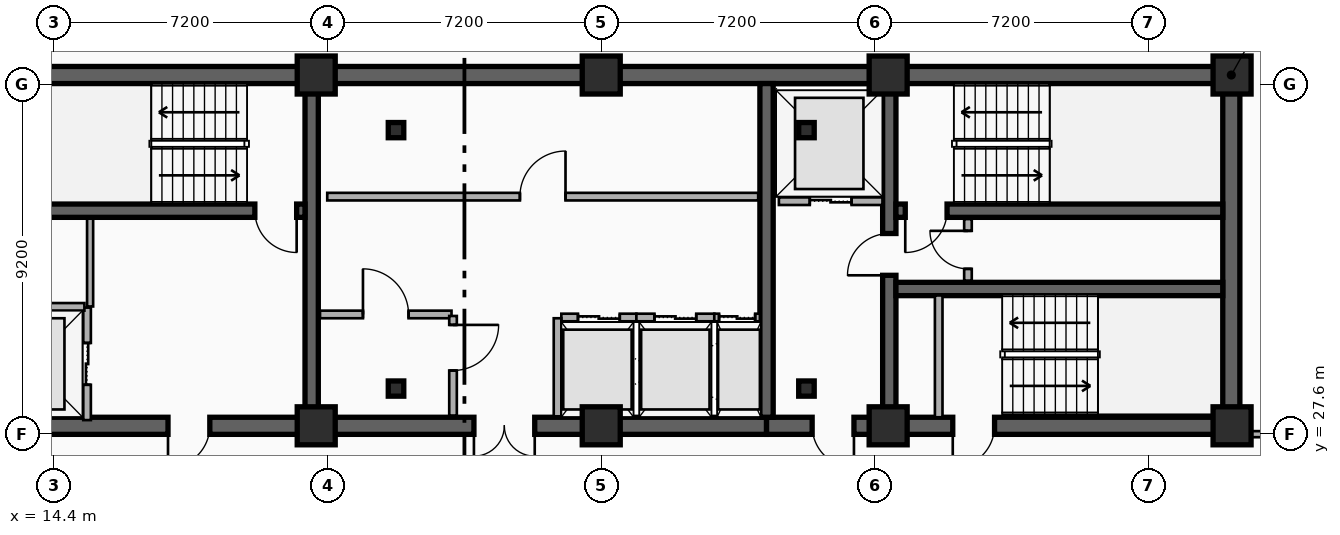
"""IFC4 building model, lengths in metres.
Left out: names, types, materials, properties, quantities, classifications, styles, units other than length and angle.
Written with IfcOpenShell. Run it as: python <this file> out.ifc"""

import sys

from ifc_helpers import new_model, si_unit, direction, frame, frame_2d, origin, origin_2d, place, context, subcontext, project, spatial, rectangle, i_section, extrude, element, fill, save


model = new_model("IFC4")
c1 = context("Model", 3, precision=1e-05, world=origin(), true_north=direction((0.0, 1.0)))
c2 = subcontext(c1, "Body", "Model", "MODEL_VIEW")
j1 = project(units=[si_unit("LENGTHUNIT", "METRE"), si_unit("PLANEANGLEUNIT", "RADIAN")], contexts=[c1])
p1 = place(None, origin())
s1 = spatial("IfcSite", under=j1, at=p1, CompositionType="ELEMENT")
p2 = place(p1, origin())
s2 = spatial("IfcBuilding", under=s1, at=p2, CompositionType="ELEMENT")
p3 = place(p2, frame((0.0, 0.0, 225.6)))
s3 = spatial("IfcBuildingStorey", under=s2, at=p3, CompositionType="ELEMENT", Elevation=225.6)
p4 = place(p3, frame((12.15, 37.05, 0.0), z_axis=(0.0, 0.0, 1.0), x_axis=(1.0, 0.0, 0.0)))
e1 = element("IfcWall", 1, at=p4, inside=s3, PredefinedType="SHEAR", context=c2, shape_type="SweptSolid", body=[
    extrude(rectangle(XDim=33.23, YDim=0.45, at=frame_2d((16.615, 0.0))), origin(), (0.0, 0.0, 1.0), 3.6),
])
p5 = place(p3, frame((21.18, 27.82, 0.0), z_axis=(0.0, 0.0, 1.0), x_axis=(-1.0, 0.0, 0.0)))
e2 = element("IfcWall", 2, at=p5, inside=s3, PredefinedType="SHEAR", context=c2, shape_type="SweptSolid", body=[
    extrude(rectangle(XDim=9.03, YDim=0.45, at=frame_2d((4.515, 0.0))), origin(), (0.0, 0.0, 1.0), 3.6),
])
p6 = place(p5, frame((2.68, 0.0, 0.0)))
e3 = element("IfcOpeningElement", 3, at=p6, cuts=e2, PredefinedType="OPENING", context=c2, shape_type="SweptSolid", body=[
    extrude(rectangle(XDim=1.1, YDim=2.15, at=frame_2d((0.55, 1.075))), frame((0.0, 0.235, 0.0), z_axis=(0.0, -1.0, 0.0), x_axis=(1.0, 0.0, 0.0)), (0.0, 0.0, 1.0), 0.47),
])
p7 = place(p3, frame((33.15, 27.82, 0.0), z_axis=(0.0, 0.0, 1.0), x_axis=(-1.0, 0.0, 0.0)))
e4 = element("IfcWall", 4, at=p7, inside=s3, PredefinedType="SHEAR", context=c2, shape_type="SweptSolid", body=[
    extrude(rectangle(XDim=11.97, YDim=0.45, at=frame_2d((5.985, 0.0))), origin(), (0.0, 0.0, 1.0), 3.6),
])
p8 = place(p7, frame((6.1, 0.0, 0.0)))
e5 = element("IfcOpeningElement", 5, at=p8, cuts=e4, PredefinedType="OPENING", context=c2, shape_type="SweptSolid", body=[
    extrude(rectangle(XDim=1.6, YDim=2.2, at=frame_2d((0.8, 1.1))), frame((0.0, 0.235, 0.0), z_axis=(0.0, -1.0, 0.0), x_axis=(1.0, 0.0, 0.0)), (0.0, 0.0, 1.0), 0.47),
])
p9 = place(p3, frame((45.38, 27.82, 0.0), z_axis=(0.0, 0.0, 1.0), x_axis=(-1.0, 0.0, 0.0)))
e6 = element("IfcWall", 6, at=p9, inside=s3, PredefinedType="SHEAR", context=c2, shape_type="SweptSolid", body=[
    extrude(rectangle(XDim=12.23, YDim=0.45, at=frame_2d((6.115, 0.0))), origin(), (0.0, 0.0, 1.0), 3.6),
])
p10 = place(p9, frame((9.93, 0.0, 0.0)))
e7 = element("IfcOpeningElement", 7, at=p10, cuts=e6, PredefinedType="OPENING", context=c2, shape_type="SweptSolid", body=[
    extrude(rectangle(XDim=1.1, YDim=2.15, at=frame_2d((0.55, 1.075))), frame((0.0, 0.235, 0.0), z_axis=(0.0, -1.0, 0.0), x_axis=(1.0, 0.0, 0.0)), (0.0, 0.0, 1.0), 0.47),
])
p11 = place(p9, frame((6.23, 0.0, 0.0)))
e8 = element("IfcOpeningElement", 8, at=p11, cuts=e6, PredefinedType="OPENING", context=c2, shape_type="SweptSolid", body=[
    extrude(rectangle(XDim=1.1, YDim=2.15, at=frame_2d((0.55, 1.075))), frame((0.0, 0.235, 0.0), z_axis=(0.0, -1.0, 0.0), x_axis=(1.0, 0.0, 0.0)), (0.0, 0.0, 1.0), 0.47),
])
p12 = place(p3, frame((45.38, 28.045, 0.0), z_axis=(0.0, 0.0, 1.0), x_axis=(0.0, 1.0, 0.0)))
e9 = element("IfcWall", 9, at=p12, inside=s3, PredefinedType="SHEAR", context=c2, shape_type="SweptSolid", body=[
    extrude(rectangle(XDim=8.78, YDim=0.45, at=frame_2d((4.39, 0.0))), origin(), (0.0, 0.0, 1.0), 3.6),
])
for number, where, z_axis, x_axis in (
    (10, (21.18, 28.045, 0.0), (0.0, 0.0, 1.0), (0.0, 1.0, 0.0)),
    (11, (33.15, 28.045, 0.0), (0.0, 0.0, 1.0), (0.0, 1.0, 0.0)),
):
    element("IfcWall", number, at=place(p3, frame(where, z_axis=z_axis, x_axis=x_axis)), inside=s3, PredefinedType="SHEAR", context=c2, shape_type="SweptSolid", body=[
        extrude(rectangle(XDim=8.78, YDim=0.35, at=frame_2d((4.39, 0.0))), origin(), (0.0, 0.0, 1.0), 3.6),
    ])
p13 = place(p3, frame((36.38, 28.045, 0.0), z_axis=(0.0, 0.0, 1.0), x_axis=(0.0, 1.0, 0.0)))
e12 = element("IfcWall", 12, at=p13, inside=s3, PredefinedType="SHEAR", context=c2, shape_type="SweptSolid", body=[
    extrude(rectangle(XDim=8.78, YDim=0.35, at=frame_2d((4.39, 0.0))), origin(), (0.0, 0.0, 1.0), 3.6),
])
p14 = place(p13, frame((3.735, 0.0, 0.0)))
e13 = element("IfcOpeningElement", 13, at=p14, cuts=e12, PredefinedType="OPENING", context=c2, shape_type="SweptSolid", body=[
    extrude(rectangle(XDim=1.1, YDim=2.15, at=frame_2d((0.55, 1.075))), frame((0.0, 0.185, 0.0), z_axis=(0.0, -1.0, 0.0), x_axis=(1.0, 0.0, 0.0)), (0.0, 0.0, 1.0), 0.37),
])
p15 = place(p3, frame((21.005, 33.48, 0.0), z_axis=(0.0, 0.0, 1.0), x_axis=(-1.0, 0.0, 0.0)))
e14 = element("IfcWall", 14, at=p15, inside=s3, PredefinedType="SHEAR", context=c2, shape_type="SweptSolid", body=[
    extrude(rectangle(XDim=8.63, YDim=0.35, at=frame_2d((4.315, 0.0))), origin(), (0.0, 0.0, 1.0), 3.6),
])
p16 = place(p15, frame((0.22, 0.0, 0.0)))
e15 = element("IfcOpeningElement", 15, at=p16, cuts=e14, PredefinedType="OPENING", context=c2, shape_type="SweptSolid", body=[
    extrude(rectangle(XDim=1.1, YDim=2.15, at=frame_2d((0.55, 1.075))), frame((0.0, 0.185, 0.0), z_axis=(0.0, -1.0, 0.0), x_axis=(1.0, 0.0, 0.0)), (0.0, 0.0, 1.0), 0.37),
])
p17 = place(p3, frame((45.155, 33.48, 0.0), z_axis=(0.0, 0.0, 1.0), x_axis=(-1.0, 0.0, 0.0)))
e16 = element("IfcWall", 16, at=p17, inside=s3, PredefinedType="SHEAR", context=c2, shape_type="SweptSolid", body=[
    extrude(rectangle(XDim=8.6, YDim=0.35, at=frame_2d((4.3, 0.0))), origin(), (0.0, 0.0, 1.0), 3.6),
])
p18 = place(p17, frame((7.255, 0.0, 0.0)))
e17 = element("IfcOpeningElement", 17, at=p18, cuts=e16, PredefinedType="OPENING", context=c2, shape_type="SweptSolid", body=[
    extrude(rectangle(XDim=1.1, YDim=2.15, at=frame_2d((0.55, 1.075))), frame((0.0, 0.185, 0.0), z_axis=(0.0, -1.0, 0.0), x_axis=(1.0, 0.0, 0.0)), (0.0, 0.0, 1.0), 0.37),
])
p19 = place(p3, frame((36.555, 31.42, 0.0), z_axis=(0.0, 0.0, 1.0), x_axis=(1.0, 0.0, 0.0)))
e18 = element("IfcWall", 18, at=p19, inside=s3, PredefinedType="SHEAR", context=c2, shape_type="SweptSolid", body=[
    extrude(rectangle(XDim=8.6, YDim=0.35, at=frame_2d((4.3, 0.0))), origin(), (0.0, 0.0, 1.0), 3.6),
])
for number, where, z_axis, x_axis in (
    (19, (23.4, 28.8, 0.0), (0.0, 0.0, 1.0), (1.0, 0.0, 0.0)),
    (20, (34.2, 28.8, 0.0), (0.0, 0.0, 1.0), (1.0, 0.0, 0.0)),
    (21, (34.2, 35.6, 0.0), (0.0, 0.0, 1.0), (1.0, 0.0, 0.0)),
    (22, (23.4, 35.6, 0.0), (0.0, 0.0, 1.0), (1.0, 0.0, 0.0)),
):
    element("IfcColumn", number, at=place(p3, frame(where, z_axis=z_axis, x_axis=x_axis)), inside=s3, PredefinedType="COLUMN", context=c2, shape_type="SweptSolid", body=[
        extrude(i_section(OverallWidth=0.408, OverallDepth=0.4, WebThickness=0.025, FlangeThickness=0.039, FilletRadius=0.015, at=origin_2d()), origin(), (0.0, 0.0, 1.0), 3.6),
    ])
for number, where, z_axis, x_axis in (
    (23, (21.3, 27.82, 0.0), (0.0, 0.0, 1.0), (1.0, 0.0, 0.0)),
    (24, (21.3, 37.05, 0.0), (0.0, 0.0, 1.0), (1.0, 0.0, 0.0)),
    (25, (28.8, 27.82, 0.0), (0.0, 0.0, 1.0), (1.0, 0.0, 0.0)),
    (26, (28.8, 37.05, 0.0), (0.0, 0.0, 1.0), (1.0, 0.0, 0.0)),
    (27, (36.35, 27.82, 0.0), (0.0, 0.0, 1.0), (1.0, 0.0, 0.0)),
    (28, (36.35, 37.05, 0.0), (0.0, 0.0, 1.0), (1.0, 0.0, 0.0)),
    (29, (45.4, 27.82, 0.0), (0.0, 0.0, 1.0), (1.0, 0.0, 0.0)),
    (30, (45.4, 37.05, 0.0), (0.0, 0.0, 1.0), (1.0, 0.0, 0.0)),
):
    element("IfcColumn", number, at=place(p3, frame(where, z_axis=z_axis, x_axis=x_axis)), inside=s3, PredefinedType="COLUMN", context=c2, shape_type="SweptSolid", body=[
        extrude(rectangle(XDim=1.0, YDim=1.0, at=origin_2d()), origin(), (0.0, 0.0, 1.0), 3.6),
    ])
p20 = place(p3, frame((15.27, 27.97, 0.0), z_axis=(0.0, 0.0, 1.0), x_axis=(0.0, 1.0, 0.0)))
e31 = element("IfcWall", 31, at=p20, inside=s3, PredefinedType="PARTITIONING", context=c2, shape_type="SweptSolid", body=[
    extrude(rectangle(XDim=2.96, YDim=0.2, at=frame_2d((1.48, 0.0))), origin(), (0.0, 0.0, 1.0), 2.41),
])
p21 = place(p20, frame((0.93, 0.0, 0.0)))
e32 = element("IfcOpeningElement", 32, at=p21, cuts=e31, PredefinedType="OPENING", context=c2, shape_type="SweptSolid", body=[
    extrude(rectangle(XDim=1.1, YDim=2.15, at=frame_2d((0.55, 1.075))), frame((0.0, 0.11, 0.0), z_axis=(0.0, -1.0, 0.0), x_axis=(1.0, 0.0, 0.0)), (0.0, 0.0, 1.0), 0.22),
])
p22 = place(p3, frame((12.45, 30.95, 0.0), z_axis=(0.0, 0.0, 1.0), x_axis=(1.0, 0.0, 0.0)))
e33 = element("IfcWall", 33, at=p22, inside=s3, PredefinedType="PARTITIONING", context=c2, shape_type="SweptSolid", body=[
    extrude(rectangle(XDim=2.75, YDim=0.2, at=frame_2d((1.375, 0.0))), origin(), (0.0, 0.0, 1.0), 2.41),
])
p23 = place(p3, frame((33.475, 33.73, 0.0), z_axis=(0.0, 0.0, 1.0), x_axis=(1.0, 0.0, 0.0)))
e34 = element("IfcWall", 34, at=p23, inside=s3, PredefinedType="PARTITIONING", context=c2, shape_type="SweptSolid", body=[
    extrude(rectangle(XDim=2.725, YDim=0.2, at=frame_2d((1.362, 0.0))), origin(), (0.0, 0.0, 1.0), 2.41),
])
p24 = place(p23, frame((0.812, 0.0, 0.0)))
e35 = element("IfcOpeningElement", 35, at=p24, cuts=e34, PredefinedType="OPENING", context=c2, shape_type="SweptSolid", body=[
    extrude(rectangle(XDim=1.1, YDim=2.15, at=frame_2d((0.55, 1.075))), frame((0.0, 0.11, 0.0), z_axis=(0.0, -1.0, 0.0), x_axis=(1.0, 0.0, 0.0)), (0.0, 0.0, 1.0), 0.22),
])
p25 = place(p3, frame((27.75, 30.67, 0.0), z_axis=(0.0, 0.0, 1.0), x_axis=(1.0, 0.0, 0.0)))
e36 = element("IfcWall", 36, at=p25, inside=s3, PredefinedType="PARTITIONING", context=c2, shape_type="SweptSolid", body=[
    extrude(rectangle(XDim=1.975, YDim=0.2, at=frame_2d((0.988, 0.0))), origin(), (0.0, 0.0, 1.0), 2.41),
])
p26 = place(p25, frame((0.438, 0.0, 0.0)))
e37 = element("IfcOpeningElement", 37, at=p26, cuts=e36, PredefinedType="OPENING", context=c2, shape_type="SweptSolid", body=[
    extrude(rectangle(XDim=1.1, YDim=2.15, at=frame_2d((0.55, 1.075))), frame((0.0, 0.11, 0.0), z_axis=(0.0, -1.0, 0.0), x_axis=(1.0, 0.0, 0.0)), (0.0, 0.0, 1.0), 0.22),
])
p27 = place(p3, frame((27.65, 28.07, 0.0), z_axis=(0.0, 0.0, 1.0), x_axis=(0.0, 1.0, 0.0)))
e38 = element("IfcWall", 38, at=p27, inside=s3, PredefinedType="PARTITIONING", context=c2, shape_type="SweptSolid", body=[
    extrude(rectangle(XDim=2.58, YDim=0.2, at=frame_2d((1.29, 0.0))), origin(), (0.0, 0.0, 1.0), 2.41),
])
p28 = place(p3, frame((29.725, 30.67, 0.0), z_axis=(0.0, 0.0, 1.0), x_axis=(1.0, 0.0, 0.0)))
e39 = element("IfcWall", 39, at=p28, inside=s3, PredefinedType="PARTITIONING", context=c2, shape_type="SweptSolid", body=[
    extrude(rectangle(XDim=2.05, YDim=0.2, at=frame_2d((1.025, 0.0))), origin(), (0.0, 0.0, 1.0), 2.72),
])
p29 = place(p28, frame((0.475, 0.0, 0.0)))
e40 = element("IfcOpeningElement", 40, at=p29, cuts=e39, PredefinedType="OPENING", context=c2, shape_type="SweptSolid", body=[
    extrude(rectangle(XDim=1.1, YDim=2.15, at=frame_2d((0.55, 1.075))), frame((0.0, 0.11, 0.0), z_axis=(0.0, -1.0, 0.0), x_axis=(1.0, 0.0, 0.0)), (0.0, 0.0, 1.0), 0.22),
])
p30 = place(p3, frame((31.775, 30.67, 0.0), z_axis=(0.0, 0.0, 1.0), x_axis=(1.0, 0.0, 0.0)))
e41 = element("IfcWall", 41, at=p30, inside=s3, PredefinedType="PARTITIONING", context=c2, shape_type="SweptSolid", body=[
    extrude(rectangle(XDim=1.2, YDim=0.2, at=frame_2d((0.6, 0.0))), origin(), (0.0, 0.0, 1.0), 2.72),
])
p31 = place(p30, frame((0.125, 0.0, 0.0)))
e42 = element("IfcOpeningElement", 42, at=p31, cuts=e41, PredefinedType="OPENING", context=c2, shape_type="SweptSolid", body=[
    extrude(rectangle(XDim=0.95, YDim=2.15, at=frame_2d((0.475, 1.075))), frame((0.0, 0.11, 0.0), z_axis=(0.0, -1.0, 0.0), x_axis=(1.0, 0.0, 0.0)), (0.0, 0.0, 1.0), 0.22),
])
p32 = place(p3, frame((37.68, 28.045, 0.0), z_axis=(0.0, 0.0, 1.0), x_axis=(0.0, 1.0, 0.0)))
e43 = element("IfcWall", 43, at=p32, inside=s3, PredefinedType="PARTITIONING", context=c2, shape_type="SweptSolid", body=[
    extrude(rectangle(XDim=3.205, YDim=0.2, at=frame_2d((1.603, 0.0))), origin(), (0.0, 0.0, 1.0), 2.72),
])
p33 = place(p3, frame((38.45, 31.64, 0.0), z_axis=(0.0, 0.0, 1.0), x_axis=(0.0, 1.0, 0.0)))
e44 = element("IfcWall", 44, at=p33, inside=s3, PredefinedType="PARTITIONING", context=c2, shape_type="SweptSolid", body=[
    extrude(rectangle(XDim=1.62, YDim=0.2, at=frame_2d((0.81, 0.0))), origin(), (0.0, 0.0, 1.0), 3.34),
])
p34 = place(p33, frame((0.31, 0.0, 0.0)))
e45 = element("IfcOpeningElement", 45, at=p34, cuts=e44, PredefinedType="OPENING", context=c2, shape_type="SweptSolid", body=[
    extrude(rectangle(XDim=1.0, YDim=2.15, at=frame_2d((0.5, 1.075))), frame((0.0, 0.11, 0.0), z_axis=(0.0, -1.0, 0.0), x_axis=(1.0, 0.0, 0.0)), (0.0, 0.0, 1.0), 0.22),
])
p35 = place(p3, frame((21.4, 30.75, 0.0), z_axis=(0.0, 0.0, 1.0), x_axis=(1.0, 0.0, 0.0)))
e46 = element("IfcWall", 46, at=p35, inside=s3, PredefinedType="PARTITIONING", context=c2, shape_type="SweptSolid", body=[
    extrude(rectangle(XDim=3.46, YDim=0.2, at=frame_2d((1.73, 0.0))), origin(), (0.0, 0.0, 1.0), 2.41),
])
p36 = place(p35, frame((1.13, 0.0, 0.0)))
e47 = element("IfcOpeningElement", 47, at=p36, cuts=e46, PredefinedType="OPENING", context=c2, shape_type="SweptSolid", body=[
    extrude(rectangle(XDim=1.2, YDim=2.15, at=frame_2d((0.6, 1.075))), frame((0.0, 0.11, 0.0), z_axis=(0.0, -1.0, 0.0), x_axis=(1.0, 0.0, 0.0)), (0.0, 0.0, 1.0), 0.22),
])
p37 = place(p3, frame((21.59, 33.85, 0.0), z_axis=(0.0, 0.0, 1.0), x_axis=(1.0, 0.0, 0.0)))
e48 = element("IfcWall", 48, at=p37, inside=s3, PredefinedType="PARTITIONING", context=c2, shape_type="SweptSolid", body=[
    extrude(rectangle(XDim=11.34, YDim=0.2, at=frame_2d((5.67, 0.0))), origin(), (0.0, 0.0, 1.0), 2.41),
])
p38 = place(p37, frame((5.07, 0.0, 0.0)))
e49 = element("IfcOpeningElement", 49, at=p38, cuts=e48, PredefinedType="OPENING", context=c2, shape_type="SweptSolid", body=[
    extrude(rectangle(XDim=1.2, YDim=2.15, at=frame_2d((0.6, 1.075))), frame((0.0, 0.11, 0.0), z_axis=(0.0, -1.0, 0.0), x_axis=(1.0, 0.0, 0.0)), (0.0, 0.0, 1.0), 0.22),
])
p39 = place(p3, frame((24.9, 30.71, 0.0), z_axis=(0.0, 0.0, 1.0), x_axis=(0.0, -1.0, 0.0)))
e50 = element("IfcWall", 50, at=p39, inside=s3, PredefinedType="PARTITIONING", context=c2, shape_type="SweptSolid", body=[
    extrude(rectangle(XDim=2.62, YDim=0.2, at=frame_2d((1.31, 0.0))), origin(), (0.0, 0.0, 1.0), 2.72),
])
p40 = place(p39, frame((0.235, 0.0, 0.0)))
e51 = element("IfcOpeningElement", 51, at=p40, cuts=e50, PredefinedType="OPENING", context=c2, shape_type="SweptSolid", body=[
    extrude(rectangle(XDim=1.2, YDim=2.15, at=frame_2d((0.6, 1.075))), frame((0.0, 0.11, 0.0), z_axis=(0.0, -1.0, 0.0), x_axis=(1.0, 0.0, 0.0)), (0.0, 0.0, 1.0), 0.22),
])
p41 = place(p3, frame((15.35, 30.96, 0.0), z_axis=(0.0, 0.0, 1.0), x_axis=(0.0, 1.0, 0.0)))
e52 = element("IfcWall", 52, at=p41, inside=s3, PredefinedType="PARTITIONING", context=c2, shape_type="SweptSolid", body=[
    extrude(rectangle(XDim=2.31, YDim=0.16, at=frame_2d((1.155, 0.0))), origin(), (0.0, 0.0, 1.0), 3.34),
])
p42 = place(p3, frame((45.41, 27.6, 0.0), z_axis=(0.0, 0.0, 1.0), x_axis=(1.0, 0.0, 0.0)))
e53 = element("IfcWall", 53, at=p42, inside=s3, PredefinedType="PARTITIONING", context=c2, shape_type="SweptSolid", body=[
    extrude(rectangle(XDim=0.91, YDim=0.16, at=frame_2d((0.455, 0.0))), origin(), (0.0, 0.0, 1.0), 2.41),
])
p43 = place(p21, origin())
e54 = element("IfcDoor", 54, at=p43, inside=s3, OperationType="DOUBLE_DOOR_SLIDING", PredefinedType="DOOR", context=c2, shape_type="SweptSolid", body=[
    extrude(rectangle(XDim=1.1, YDim=2.15, at=frame_2d((0.55, 1.075))), frame((0.0, 0.025, 0.0), z_axis=(0.0, -1.0, 0.0), x_axis=(1.0, 0.0, 0.0)), (0.0, 0.0, 1.0), 0.05),
])
fill(e32, e54)
p44 = place(p24, origin())
e55 = element("IfcDoor", 55, at=p44, inside=s3, OperationType="DOUBLE_DOOR_SLIDING", PredefinedType="DOOR", context=c2, shape_type="SweptSolid", body=[
    extrude(rectangle(XDim=1.1, YDim=2.15, at=frame_2d((0.55, 1.075))), frame((0.0, 0.025, 0.0), z_axis=(0.0, -1.0, 0.0), x_axis=(1.0, 0.0, 0.0)), (0.0, 0.0, 1.0), 0.05),
])
fill(e35, e55)
p45 = place(p26, origin())
e56 = element("IfcDoor", 56, at=p45, inside=s3, OperationType="DOUBLE_DOOR_SLIDING", PredefinedType="DOOR", context=c2, shape_type="SweptSolid", body=[
    extrude(rectangle(XDim=1.1, YDim=2.15, at=frame_2d((0.55, 1.075))), frame((0.0, 0.025, 0.0), z_axis=(0.0, -1.0, 0.0), x_axis=(1.0, 0.0, 0.0)), (0.0, 0.0, 1.0), 0.05),
])
fill(e37, e56)
p46 = place(p29, origin())
e57 = element("IfcDoor", 57, at=p46, inside=s3, OperationType="DOUBLE_DOOR_SLIDING", PredefinedType="DOOR", context=c2, shape_type="SweptSolid", body=[
    extrude(rectangle(XDim=1.1, YDim=2.15, at=frame_2d((0.55, 1.075))), frame((0.0, 0.025, 0.0), z_axis=(0.0, -1.0, 0.0), x_axis=(1.0, 0.0, 0.0)), (0.0, 0.0, 1.0), 0.05),
])
fill(e40, e57)
p47 = place(p31, origin())
e58 = element("IfcDoor", 58, at=p47, inside=s3, OperationType="DOUBLE_DOOR_SLIDING", PredefinedType="DOOR", context=c2, shape_type="SweptSolid", body=[
    extrude(rectangle(XDim=0.95, YDim=2.15, at=frame_2d((0.475, 1.075))), frame((0.0, 0.025, 0.0), z_axis=(0.0, -1.0, 0.0), x_axis=(1.0, 0.0, 0.0)), (0.0, 0.0, 1.0), 0.05),
])
fill(e42, e58)
p48 = place(p16, origin())
e59 = element("IfcDoor", 59, at=p48, inside=s3, OperationType="SINGLE_SWING_LEFT", PredefinedType="DOOR", context=c2, shape_type="SweptSolid", body=[
    extrude(rectangle(XDim=1.1, YDim=2.15, at=frame_2d((0.55, 1.075))), frame((0.0, 0.025, 0.0), z_axis=(0.0, -1.0, 0.0), x_axis=(1.0, 0.0, 0.0)), (0.0, 0.0, 1.0), 0.05),
])
fill(e15, e59)
p49 = place(p6, origin())
e60 = element("IfcDoor", 60, at=p49, inside=s3, OperationType="SINGLE_SWING_RIGHT", PredefinedType="DOOR", context=c2, shape_type="SweptSolid", body=[
    extrude(rectangle(XDim=1.1, YDim=2.15, at=frame_2d((0.55, 1.075))), frame((0.0, 0.025, 0.0), z_axis=(0.0, -1.0, 0.0), x_axis=(1.0, 0.0, 0.0)), (0.0, 0.0, 1.0), 0.05),
])
fill(e3, e60)
p50 = place(p18, origin())
e61 = element("IfcDoor", 61, at=p50, inside=s3, OperationType="SINGLE_SWING_RIGHT", PredefinedType="DOOR", context=c2, shape_type="SweptSolid", body=[
    extrude(rectangle(XDim=1.1, YDim=2.15, at=frame_2d((0.55, 1.075))), frame((0.0, 0.025, 0.0), z_axis=(0.0, -1.0, 0.0), x_axis=(1.0, 0.0, 0.0)), (0.0, 0.0, 1.0), 0.05),
])
fill(e17, e61)
p51 = place(p14, origin())
e62 = element("IfcDoor", 62, at=p51, inside=s3, OperationType="SINGLE_SWING_LEFT", PredefinedType="DOOR", context=c2, shape_type="SweptSolid", body=[
    extrude(rectangle(XDim=1.1, YDim=2.15, at=frame_2d((0.55, 1.075))), frame((0.0, 0.025, 0.0), z_axis=(0.0, -1.0, 0.0), x_axis=(1.0, 0.0, 0.0)), (0.0, 0.0, 1.0), 0.05),
])
fill(e13, e62)
p52 = place(p10, origin())
e63 = element("IfcDoor", 63, at=p52, inside=s3, OperationType="SINGLE_SWING_LEFT", PredefinedType="DOOR", context=c2, shape_type="SweptSolid", body=[
    extrude(rectangle(XDim=1.1, YDim=2.15, at=frame_2d((0.55, 1.075))), frame((0.0, 0.025, 0.0), z_axis=(0.0, -1.0, 0.0), x_axis=(1.0, 0.0, 0.0)), (0.0, 0.0, 1.0), 0.05),
])
fill(e7, e63)
p53 = place(p11, origin())
e64 = element("IfcDoor", 64, at=p53, inside=s3, OperationType="SINGLE_SWING_RIGHT", PredefinedType="DOOR", context=c2, shape_type="SweptSolid", body=[
    extrude(rectangle(XDim=1.1, YDim=2.15, at=frame_2d((0.55, 1.075))), frame((0.0, 0.025, 0.0), z_axis=(0.0, -1.0, 0.0), x_axis=(1.0, 0.0, 0.0)), (0.0, 0.0, 1.0), 0.05),
])
fill(e8, e64)
p54 = place(p8, origin())
e65 = element("IfcDoor", 65, at=p54, inside=s3, OperationType="SINGLE_SWING_LEFT", PredefinedType="DOOR", context=c2, shape_type="SweptSolid", body=[
    extrude(rectangle(XDim=1.6, YDim=2.2, at=frame_2d((0.8, 1.1))), frame((0.0, 0.025, 0.0), z_axis=(0.0, -1.0, 0.0), x_axis=(1.0, 0.0, 0.0)), (0.0, 0.0, 1.0), 0.05),
])
fill(e5, e65)
p55 = place(p34, origin())
e66 = element("IfcDoor", 66, at=p55, inside=s3, OperationType="SINGLE_SWING_RIGHT", PredefinedType="DOOR", context=c2, shape_type="SweptSolid", body=[
    extrude(rectangle(XDim=1.0, YDim=2.15, at=frame_2d((0.5, 1.075))), frame((0.0, 0.025, 0.0), z_axis=(0.0, -1.0, 0.0), x_axis=(1.0, 0.0, 0.0)), (0.0, 0.0, 1.0), 0.05),
])
fill(e45, e66)
p56 = place(p36, origin())
e67 = element("IfcDoor", 67, at=p56, inside=s3, OperationType="SINGLE_SWING_LEFT", PredefinedType="DOOR", context=c2, shape_type="SweptSolid", body=[
    extrude(rectangle(XDim=1.2, YDim=2.15, at=frame_2d((0.6, 1.075))), frame((0.0, 0.025, 0.0), z_axis=(0.0, -1.0, 0.0), x_axis=(1.0, 0.0, 0.0)), (0.0, 0.0, 1.0), 0.05),
])
fill(e47, e67)
p57 = place(p38, origin())
e68 = element("IfcDoor", 68, at=p57, inside=s3, OperationType="SINGLE_SWING_RIGHT", PredefinedType="DOOR", context=c2, shape_type="SweptSolid", body=[
    extrude(rectangle(XDim=1.2, YDim=2.15, at=frame_2d((0.6, 1.075))), frame((0.0, 0.025, 0.0), z_axis=(0.0, -1.0, 0.0), x_axis=(1.0, 0.0, 0.0)), (0.0, 0.0, 1.0), 0.05),
])
fill(e49, e68)
p58 = place(p40, origin())
e69 = element("IfcDoor", 69, at=p58, inside=s3, OperationType="SINGLE_SWING_LEFT", PredefinedType="DOOR", context=c2, shape_type="SweptSolid", body=[
    extrude(rectangle(XDim=1.2, YDim=2.15, at=frame_2d((0.6, 1.075))), frame((0.0, 0.025, 0.0), z_axis=(0.0, -1.0, 0.0), x_axis=(1.0, 0.0, 0.0)), (0.0, 0.0, 1.0), 0.05),
])
fill(e51, e69)
save(model, sys.argv[1])
